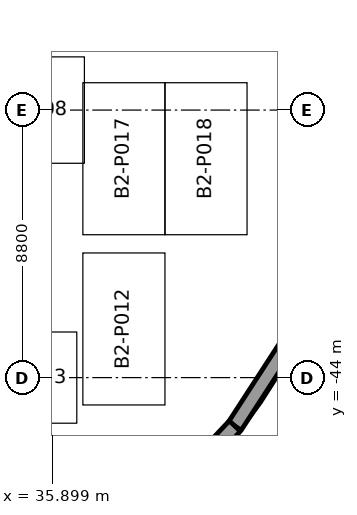
"""IFC4 building model, lengths in metres.
Left out: names, types, materials, properties, quantities, classifications, styles, units other than length and angle.
Written with IfcOpenShell. Run it as: python <this file> out.ifc"""

import sys

from ifc_helpers import new_model, si_unit, direction, frame, frame_2d, origin, place, context, subcontext, project, spatial, rectangle, extrude, element, save


model = new_model("IFC4")
c1 = context("Model", 3, precision=1e-05, world=origin(), true_north=direction((0.0, 1.0)))
c2 = subcontext(c1, "Body", "Model", "MODEL_VIEW")
j1 = project(units=[si_unit("LENGTHUNIT", "METRE"), si_unit("PLANEANGLEUNIT", "RADIAN")], contexts=[c1])
p1 = place(None, origin())
s1 = spatial("IfcSite", under=j1, at=p1, CompositionType="ELEMENT")
p2 = place(p1, origin())
s2 = spatial("IfcBuilding", under=s1, at=p2, CompositionType="ELEMENT")
p3 = place(p2, frame((0.0, 0.0, -9.0)))
s3 = spatial("IfcBuildingStorey", under=s2, at=p3, CompositionType="ELEMENT", Elevation=-9.0)
p4 = place(p3, frame((43.809, -42.65, 0.0), z_axis=(0.0, 0.0, 1.0), x_axis=(-0.544416054245, -0.838815331214, 0.0)))
e1 = element("IfcWall", 1, at=p4, inside=s3, PredefinedType="SOLIDWALL", context=c2, shape_type="SweptSolid", body=[
    extrude(rectangle(XDim=3.51, YDim=0.5, at=frame_2d((1.755, 0.0))), origin(), (0.0, 0.0, 1.0), 4.5),
])
p5 = place(p3, frame((41.898, -45.594, 0.0), z_axis=(0.0, 0.0, 1.0), x_axis=(-0.686862366834, -0.726787512982, 0.0)))
e2 = element("IfcWall", 2, at=p5, inside=s3, PredefinedType="SOLIDWALL", context=c2, shape_type="SweptSolid", body=[
    extrude(rectangle(XDim=2.281, YDim=0.5, at=frame_2d((1.14, 0.0))), origin(), (0.0, 0.0, 1.0), 4.5),
])
save(model, sys.argv[1])
